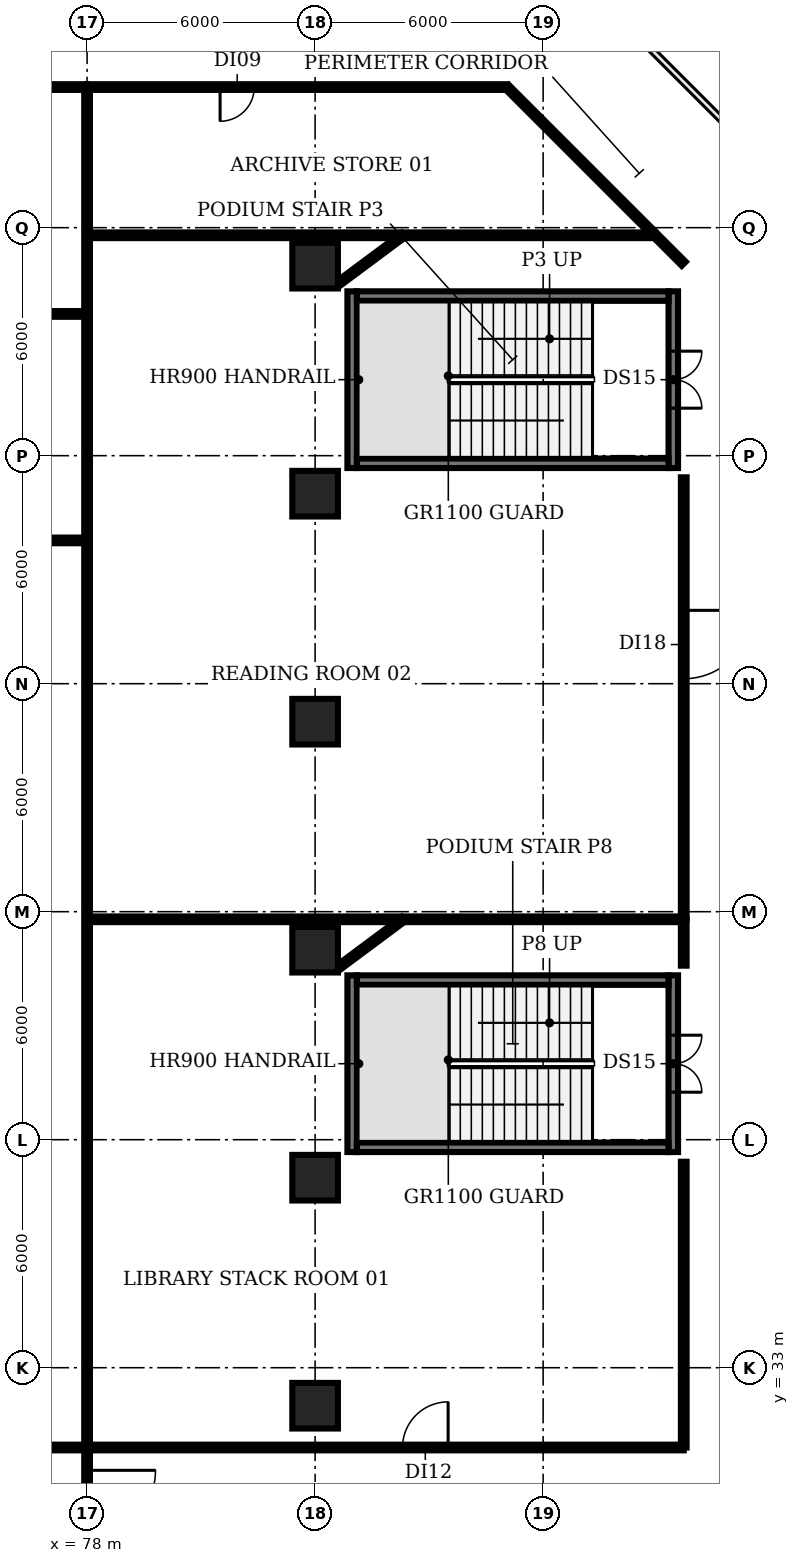
"""IFC4 building model, lengths in metres.
Left out: names, types, materials, properties, quantities, classifications, styles, units other than length and angle.
Written with IfcOpenShell. Run it as: python <this file> out.ifc"""

import sys

from ifc_helpers import new_model, si_unit, direction, frame, frame_2d, origin, origin_2d, place, context, subcontext, project, spatial, rectangle, extrude, element, fill, save


model = new_model("IFC4")
c1 = context("Model", 3, precision=1e-05, world=origin(), true_north=direction((0.0, 1.0)))
c2 = subcontext(c1, "Body", "Model", "MODEL_VIEW")
j1 = project(units=[si_unit("LENGTHUNIT", "METRE"), si_unit("PLANEANGLEUNIT", "RADIAN")], contexts=[c1])
p1 = place(None, origin())
s1 = spatial("IfcSite", under=j1, at=p1, CompositionType="ELEMENT")
p2 = place(p1, origin())
s2 = spatial("IfcBuilding", under=s1, at=p2, CompositionType="ELEMENT")
p3 = place(p2, frame((0.0, 0.0, 6.0)))
s3 = spatial("IfcBuildingStorey", under=s2, at=p3, CompositionType="ELEMENT", Elevation=6.0)
for number, where, z_axis, x_axis in (
    (1, (84.0, 32.0, 0.0), (0.0, 0.0, 1.0), (1.0, 0.0, 0.0)),
    (2, (84.0, 38.0, 0.0), (0.0, 0.0, 1.0), (1.0, 0.0, 0.0)),
    (3, (84.0, 44.0, 0.0), (0.0, 0.0, 1.0), (1.0, 0.0, 0.0)),
    (4, (84.0, 50.0, 0.0), (0.0, 0.0, 1.0), (1.0, 0.0, 0.0)),
    (5, (84.0, 56.0, 0.0), (0.0, 0.0, 1.0), (1.0, 0.0, 0.0)),
    (6, (84.0, 62.0, 0.0), (0.0, 0.0, 1.0), (1.0, 0.0, 0.0)),
):
    element("IfcColumn", number, at=place(p3, frame(where, z_axis=z_axis, x_axis=x_axis)), inside=s3, PredefinedType="COLUMN", context=c2, shape_type="SweptSolid", body=[
        extrude(rectangle(XDim=1.2, YDim=1.2, at=origin_2d()), origin(), (0.0, 0.0, 1.0), 4.6),
    ])
p4 = place(p3, frame((84.975, 56.675, 0.0), z_axis=(0.0, 0.0, 1.0), x_axis=(0.0, 1.0, 0.0)))
e7 = element("IfcWall", 7, at=p4, inside=s3, PredefinedType="SHEAR", context=c2, shape_type="SweptSolid", body=[
    extrude(rectangle(XDim=4.65, YDim=0.25, at=frame_2d((2.325, 0.0))), origin(), (0.0, 0.0, 1.0), 4.6),
])
p5 = place(p3, frame((93.425, 61.325, 0.0), z_axis=(0.0, 0.0, 1.0), x_axis=(0.0, -1.0, 0.0)))
e8 = element("IfcWall", 8, at=p5, inside=s3, PredefinedType="SHEAR", context=c2, shape_type="SweptSolid", body=[
    extrude(rectangle(XDim=4.65, YDim=0.25, at=frame_2d((2.325, 0.0))), origin(), (0.0, 0.0, 1.0), 4.6),
])
p6 = place(p5, frame((1.575, 0.0, 0.0)))
e9 = element("IfcOpeningElement", 9, at=p6, cuts=e8, PredefinedType="OPENING", context=c2, shape_type="SweptSolid", body=[
    extrude(rectangle(XDim=1.5, YDim=2.1, at=frame_2d((0.75, 1.05))), frame((0.0, 0.135, 0.0), z_axis=(0.0, -1.0, 0.0), x_axis=(1.0, 0.0, 0.0)), (0.0, 0.0, 1.0), 0.27),
])
for number, where, z_axis, x_axis in (
    (10, (85.1, 56.8, 0.0), (0.0, 0.0, 1.0), (1.0, 0.0, 0.0)),
    (11, (85.1, 61.2, 0.0), (0.0, 0.0, 1.0), (1.0, 0.0, 0.0)),
):
    element("IfcWall", number, at=place(p3, frame(where, z_axis=z_axis, x_axis=x_axis)), inside=s3, PredefinedType="SHEAR", context=c2, shape_type="SweptSolid", body=[
        extrude(rectangle(XDim=8.2, YDim=0.25, at=frame_2d((4.1, 0.0))), origin(), (0.0, 0.0, 1.0), 4.6),
    ])
p7 = place(p3, frame((84.975, 38.675, 0.0), z_axis=(0.0, 0.0, 1.0), x_axis=(0.0, 1.0, 0.0)))
e12 = element("IfcWall", 12, at=p7, inside=s3, PredefinedType="SHEAR", context=c2, shape_type="SweptSolid", body=[
    extrude(rectangle(XDim=4.65, YDim=0.25, at=frame_2d((2.325, 0.0))), origin(), (0.0, 0.0, 1.0), 4.6),
])
p8 = place(p3, frame((93.425, 43.325, 0.0), z_axis=(0.0, 0.0, 1.0), x_axis=(0.0, -1.0, 0.0)))
e13 = element("IfcWall", 13, at=p8, inside=s3, PredefinedType="SHEAR", context=c2, shape_type="SweptSolid", body=[
    extrude(rectangle(XDim=4.65, YDim=0.25, at=frame_2d((2.325, 0.0))), origin(), (0.0, 0.0, 1.0), 4.6),
])
p9 = place(p8, frame((1.575, 0.0, 0.0)))
e14 = element("IfcOpeningElement", 14, at=p9, cuts=e13, PredefinedType="OPENING", context=c2, shape_type="SweptSolid", body=[
    extrude(rectangle(XDim=1.5, YDim=2.1, at=frame_2d((0.75, 1.05))), frame((0.0, 0.135, 0.0), z_axis=(0.0, -1.0, 0.0), x_axis=(1.0, 0.0, 0.0)), (0.0, 0.0, 1.0), 0.27),
])
for number, where, z_axis, x_axis in (
    (15, (85.1, 38.8, 0.0), (0.0, 0.0, 1.0), (1.0, 0.0, 0.0)),
    (16, (85.1, 43.2, 0.0), (0.0, 0.0, 1.0), (1.0, 0.0, 0.0)),
):
    element("IfcWall", number, at=place(p3, frame(where, z_axis=z_axis, x_axis=x_axis)), inside=s3, PredefinedType="SHEAR", context=c2, shape_type="SweptSolid", body=[
        extrude(rectangle(XDim=8.2, YDim=0.25, at=frame_2d((4.1, 0.0))), origin(), (0.0, 0.0, 1.0), 4.6),
    ])
for number, where, z_axis, x_axis in (
    (17, (67.8, 30.9, 0.0), (0.0, 0.0, 1.0), (1.0, 0.0, 0.0)),
    (18, (67.8, 54.77, 0.0), (0.0, 0.0, 1.0), (1.0, 0.0, 0.0)),
    (19, (67.8, 60.73, 0.0), (0.0, 0.0, 1.0), (1.0, 0.0, 0.0)),
):
    element("IfcWall", number, at=place(p3, frame(where, z_axis=z_axis, x_axis=x_axis)), inside=s3, PredefinedType="PARTITIONING", context=c2, shape_type="SweptSolid", body=[
        extrude(rectangle(XDim=10.2, YDim=0.15, at=frame_2d((5.1, 0.0))), origin(), (0.0, 0.0, 1.0), 3.18),
    ])
p10 = place(p3, frame((78.0, 30.9, 0.0), z_axis=(0.0, 0.0, 1.0), x_axis=(0.0, -1.0, 0.0)))
e20 = element("IfcWall", 20, at=p10, inside=s3, PredefinedType="PARTITIONING", context=c2, shape_type="SweptSolid", body=[
    extrude(rectangle(XDim=3.0, YDim=0.15, at=frame_2d((1.5, 0.0))), origin(), (0.0, 0.0, 1.0), 3.18),
])
p11 = place(p10, frame((0.6, 0.0, 0.0)))
e21 = element("IfcOpeningElement", 21, at=p11, cuts=e20, PredefinedType="OPENING", context=c2, shape_type="SweptSolid", body=[
    extrude(rectangle(XDim=1.8, YDim=2.1, at=frame_2d((0.9, 1.05))), frame((0.0, 0.085, 0.0), z_axis=(0.0, -1.0, 0.0), x_axis=(1.0, 0.0, 0.0)), (0.0, 0.0, 1.0), 0.17),
])
p12 = place(p3, frame((78.0, 30.9, 0.0), z_axis=(0.0, 0.0, 1.0), x_axis=(0.0, 1.0, 0.0)))
e22 = element("IfcWall", 22, at=p12, inside=s3, PredefinedType="PARTITIONING", context=c2, shape_type="SweptSolid", body=[
    extrude(rectangle(XDim=35.8, YDim=0.15, at=frame_2d((17.9, 0.0))), origin(), (0.0, 0.0, 1.0), 3.18),
])
p13 = place(p3, frame((78.0, 30.9, 0.0), z_axis=(0.0, 0.0, 1.0), x_axis=(1.0, 0.0, 0.0)))
e23 = element("IfcWall", 23, at=p13, inside=s3, PredefinedType="PARTITIONING", context=c2, shape_type="SweptSolid", body=[
    extrude(rectangle(XDim=15.7, YDim=0.15, at=frame_2d((7.85, 0.0))), origin(), (0.0, 0.0, 1.0), 3.18),
])
p14 = place(p13, frame((8.3, 0.0, 0.0)))
e24 = element("IfcOpeningElement", 24, at=p14, cuts=e23, PredefinedType="OPENING", context=c2, shape_type="SweptSolid", body=[
    extrude(rectangle(XDim=1.2, YDim=2.1, at=frame_2d((0.6, 1.05))), frame((0.0, 0.085, 0.0), z_axis=(0.0, -1.0, 0.0), x_axis=(1.0, 0.0, 0.0)), (0.0, 0.0, 1.0), 0.17),
])
p15 = place(p3, frame((78.0, 44.8, 0.0), z_axis=(0.0, 0.0, 1.0), x_axis=(1.0, 0.0, 0.0)))
e25 = element("IfcWall", 25, at=p15, inside=s3, PredefinedType="PARTITIONING", context=c2, shape_type="SweptSolid", body=[
    extrude(rectangle(XDim=15.7, YDim=0.15, at=frame_2d((7.85, 0.0))), origin(), (0.0, 0.0, 1.0), 3.18),
])
p16 = place(p3, frame((78.0, 62.8, 0.0), z_axis=(0.0, 0.0, 1.0), x_axis=(1.0, 0.0, 0.0)))
e26 = element("IfcWall", 26, at=p16, inside=s3, PredefinedType="PARTITIONING", context=c2, shape_type="SweptSolid", body=[
    extrude(rectangle(XDim=14.95, YDim=0.15, at=frame_2d((7.475, 0.0))), origin(), (0.0, 0.0, 1.0), 3.18),
])
p17 = place(p3, frame((78.0, 66.7, 0.0), z_axis=(0.0, 0.0, 1.0), x_axis=(-1.0, 0.0, 0.0)))
e27 = element("IfcWall", 27, at=p17, inside=s3, PredefinedType="PARTITIONING", context=c2, shape_type="SweptSolid", body=[
    extrude(rectangle(XDim=10.2, YDim=0.15, at=frame_2d((5.1, 0.0))), origin(), (0.0, 0.0, 1.0), 3.18),
])
p18 = place(p17, frame((3.3, 0.0, 0.0)))
e28 = element("IfcOpeningElement", 28, at=p18, cuts=e27, PredefinedType="OPENING", context=c2, shape_type="SweptSolid", body=[
    extrude(rectangle(XDim=1.0, YDim=2.1, at=frame_2d((0.5, 1.05))), frame((0.0, 0.085, 0.0), z_axis=(0.0, -1.0, 0.0), x_axis=(1.0, 0.0, 0.0)), (0.0, 0.0, 1.0), 0.17),
])
for number, where, z_axis, x_axis in (
    (29, (84.64, 43.55, 0.0), (0.0, 0.0, 1.0), (0.802, 0.597, 0.0)),
    (30, (84.64, 61.55, 0.0), (0.0, 0.0, 1.0), (0.802, 0.597, 0.0)),
):
    element("IfcWall", number, at=place(p3, frame(where, z_axis=z_axis, x_axis=x_axis)), inside=s3, PredefinedType="PARTITIONING", context=c2, shape_type="SweptSolid", body=[
        extrude(rectangle(XDim=2.094, YDim=0.15, at=frame_2d((1.047, 0.0))), origin(), (0.0, 0.0, 1.0), 3.18),
    ])
p19 = place(p3, frame((89.05, 66.7, 0.0), z_axis=(0.0, 0.0, 1.0), x_axis=(-1.0, 0.0, 0.0)))
e31 = element("IfcWall", 31, at=p19, inside=s3, PredefinedType="PARTITIONING", context=c2, shape_type="SweptSolid", body=[
    extrude(rectangle(XDim=11.05, YDim=0.15, at=frame_2d((5.525, 0.0))), origin(), (0.0, 0.0, 1.0), 3.18),
])
p20 = place(p19, frame((6.65, 0.0, 0.0)))
e32 = element("IfcOpeningElement", 32, at=p20, cuts=e31, PredefinedType="OPENING", context=c2, shape_type="SweptSolid", body=[
    extrude(rectangle(XDim=0.9, YDim=2.1, at=frame_2d((0.45, 1.05))), frame((0.0, 0.085, 0.0), z_axis=(0.0, -1.0, 0.0), x_axis=(1.0, 0.0, 0.0)), (0.0, 0.0, 1.0), 0.17),
])
p21 = place(p3, frame((89.05, 66.7, 0.0), z_axis=(0.0, 0.0, 1.0), x_axis=(0.707106781187, -0.707106781187, 0.0)))
e33 = element("IfcWall", 33, at=p21, inside=s3, PredefinedType="PARTITIONING", context=c2, shape_type="SweptSolid", body=[
    extrude(rectangle(XDim=6.576, YDim=0.15, at=frame_2d((3.288, 0.0))), origin(), (0.0, 0.0, 1.0), 3.18),
])
p22 = place(p3, frame((93.7, 30.9, 0.0), z_axis=(0.0, 0.0, 1.0), x_axis=(0.0, 1.0, 0.0)))
e34 = element("IfcWall", 34, at=p22, inside=s3, PredefinedType="PARTITIONING", context=c2, shape_type="SweptSolid", body=[
    extrude(rectangle(XDim=7.52, YDim=0.15, at=frame_2d((3.76, 0.0))), origin(), (0.0, 0.0, 1.0), 3.18),
])
p23 = place(p3, frame((93.7, 43.58, 0.0), z_axis=(0.0, 0.0, 1.0), x_axis=(0.0, 1.0, 0.0)))
e35 = element("IfcWall", 35, at=p23, inside=s3, PredefinedType="PARTITIONING", context=c2, shape_type="SweptSolid", body=[
    extrude(rectangle(XDim=1.22, YDim=0.15, at=frame_2d((0.61, 0.0))), origin(), (0.0, 0.0, 1.0), 3.18),
])
p24 = place(p3, frame((93.7, 56.43, 0.0), z_axis=(0.0, 0.0, 1.0), x_axis=(0.0, -1.0, 0.0)))
e36 = element("IfcWall", 36, at=p24, inside=s3, PredefinedType="PARTITIONING", context=c2, shape_type="SweptSolid", body=[
    extrude(rectangle(XDim=11.63, YDim=0.15, at=frame_2d((5.815, 0.0))), origin(), (0.0, 0.0, 1.0), 3.18),
])
p25 = place(p24, frame((3.5, 0.0, 0.0)))
e37 = element("IfcOpeningElement", 37, at=p25, cuts=e36, PredefinedType="OPENING", context=c2, shape_type="SweptSolid", body=[
    extrude(rectangle(XDim=1.8, YDim=2.1, at=frame_2d((0.9, 1.05))), frame((0.0, 0.085, 0.0), z_axis=(0.0, -1.0, 0.0), x_axis=(1.0, 0.0, 0.0)), (0.0, 0.0, 1.0), 0.17),
])
p26 = place(p6, origin())
e38 = element("IfcDoor", 38, at=p26, inside=s3, OperationType="DOUBLE_DOOR_SINGLE_SWING", PredefinedType="DOOR", context=c2, shape_type="SweptSolid", body=[
    extrude(rectangle(XDim=1.5, YDim=2.1, at=frame_2d((0.75, 1.05))), frame((0.0, 0.025, 0.0), z_axis=(0.0, -1.0, 0.0), x_axis=(1.0, 0.0, 0.0)), (0.0, 0.0, 1.0), 0.05),
])
fill(e9, e38)
p27 = place(p9, origin())
e39 = element("IfcDoor", 39, at=p27, inside=s3, OperationType="DOUBLE_DOOR_SINGLE_SWING", PredefinedType="DOOR", context=c2, shape_type="SweptSolid", body=[
    extrude(rectangle(XDim=1.5, YDim=2.1, at=frame_2d((0.75, 1.05))), frame((0.0, 0.025, 0.0), z_axis=(0.0, -1.0, 0.0), x_axis=(1.0, 0.0, 0.0)), (0.0, 0.0, 1.0), 0.05),
])
fill(e14, e39)
p28 = place(p11, origin())
e40 = element("IfcDoor", 40, at=p28, inside=s3, OperationType="SINGLE_SWING_LEFT", PredefinedType="DOOR", context=c2, shape_type="SweptSolid", body=[
    extrude(rectangle(XDim=1.8, YDim=2.1, at=frame_2d((0.9, 1.05))), frame((0.0, 0.025, 0.0), z_axis=(0.0, -1.0, 0.0), x_axis=(1.0, 0.0, 0.0)), (0.0, 0.0, 1.0), 0.05),
])
fill(e21, e40)
p29 = place(p14, origin())
e41 = element("IfcDoor", 41, at=p29, inside=s3, OperationType="SINGLE_SWING_RIGHT", PredefinedType="DOOR", context=c2, shape_type="SweptSolid", body=[
    extrude(rectangle(XDim=1.2, YDim=2.1, at=frame_2d((0.6, 1.05))), frame((0.0, 0.025, 0.0), z_axis=(0.0, -1.0, 0.0), x_axis=(1.0, 0.0, 0.0)), (0.0, 0.0, 1.0), 0.05),
])
fill(e24, e41)
p30 = place(p20, origin())
e42 = element("IfcDoor", 42, at=p30, inside=s3, OperationType="SINGLE_SWING_RIGHT", PredefinedType="DOOR", context=c2, shape_type="SweptSolid", body=[
    extrude(rectangle(XDim=0.9, YDim=2.1, at=frame_2d((0.45, 1.05))), frame((0.0, 0.025, 0.0), z_axis=(0.0, -1.0, 0.0), x_axis=(1.0, 0.0, 0.0)), (0.0, 0.0, 1.0), 0.05),
])
fill(e32, e42)
p31 = place(p25, origin())
e43 = element("IfcDoor", 43, at=p31, inside=s3, OperationType="SINGLE_SWING_LEFT", PredefinedType="DOOR", context=c2, shape_type="SweptSolid", body=[
    extrude(rectangle(XDim=1.8, YDim=2.1, at=frame_2d((0.9, 1.05))), frame((0.0, 0.025, 0.0), z_axis=(0.0, -1.0, 0.0), x_axis=(1.0, 0.0, 0.0)), (0.0, 0.0, 1.0), 0.05),
])
fill(e37, e43)
save(model, sys.argv[1])
